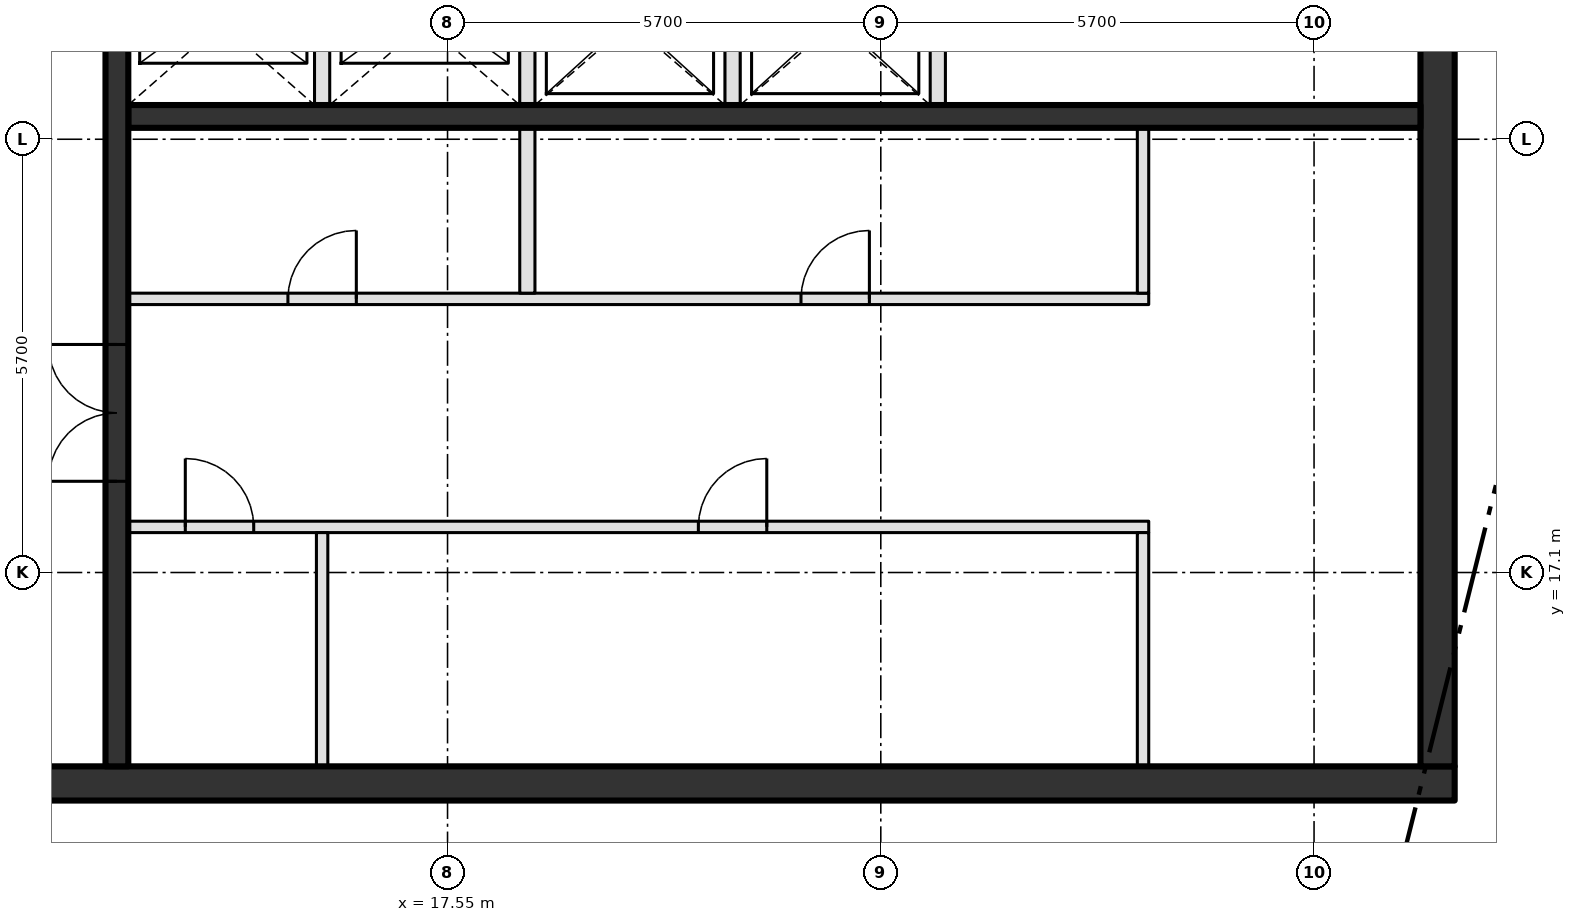
"""IFC4 building model, lengths in metres.
Left out: names, types, materials, properties, quantities, classifications, styles, units other than length and angle.
Written with IfcOpenShell. Run it as: python <this file> out.ifc"""

import sys

from ifc_helpers import new_model, si_unit, direction, frame, frame_2d, origin, place, context, subcontext, project, spatial, rectangle, extrude, element, fill, save


model = new_model("IFC4")
c1 = context("Model", 3, precision=1e-05, world=origin(), true_north=direction((0.0, 1.0)))
c2 = subcontext(c1, "Body", "Model", "MODEL_VIEW")
j1 = project(units=[si_unit("LENGTHUNIT", "METRE"), si_unit("PLANEANGLEUNIT", "RADIAN")], contexts=[c1])
p1 = place(None, origin())
s1 = spatial("IfcSite", under=j1, at=p1, CompositionType="ELEMENT")
p2 = place(p1, origin())
s2 = spatial("IfcBuilding", under=s1, at=p2, CompositionType="ELEMENT")
p3 = place(p2, frame((0.0, 0.0, 414.6)))
s3 = spatial("IfcBuildingStorey", under=s2, at=p3, CompositionType="ELEMENT", Elevation=414.6)
p4 = place(p3, frame((8.0, 14.325, -0.3), z_axis=(0.0, 0.0, 1.0), x_axis=(1.0, 0.0, 0.0)))
e1 = element("IfcWall", 1, at=p4, inside=s3, PredefinedType="SHEAR", context=c2, shape_type="SweptSolid", body=[
    extrude(rectangle(XDim=22.8, YDim=0.45, at=frame_2d((11.4, 0.0))), origin(), (0.0, 0.0, 1.0), 4.65),
])
p5 = place(p4, frame((2.3, 0.0, 0.3)))
e2 = element("IfcOpeningElement", 2, at=p5, cuts=e1, PredefinedType="OPENING", context=c2, shape_type="SweptSolid", body=[
    extrude(rectangle(XDim=1.8, YDim=2.1, at=frame_2d((0.9, 1.05))), frame((0.0, 0.235, 0.0), z_axis=(0.0, -1.0, 0.0), x_axis=(1.0, 0.0, 0.0)), (0.0, 0.0, 1.0), 0.47),
])
p6 = place(p3, frame((30.575, 14.55, -0.3), z_axis=(0.0, 0.0, 1.0), x_axis=(0.0, 1.0, 0.0)))
e3 = element("IfcWall", 3, at=p6, inside=s3, PredefinedType="SHEAR", context=c2, shape_type="SweptSolid", body=[
    extrude(rectangle(XDim=21.15, YDim=0.45, at=frame_2d((10.575, 0.0))), origin(), (0.0, 0.0, 1.0), 4.65),
])
p7 = place(p3, frame((13.35, 17.7, 0.0), z_axis=(0.0, 0.0, 1.0), x_axis=(1.0, 0.0, 0.0)))
e4 = element("IfcWall", 4, at=p7, inside=s3, PredefinedType="PARTITIONING", context=c2, shape_type="SweptSolid", body=[
    extrude(rectangle(XDim=13.425, YDim=0.15, at=frame_2d((6.712, 0.0))), origin(), (0.0, 0.0, 1.0), 4.35),
])
p8 = place(p7, frame((0.75, 0.0, 0.0)))
e5 = element("IfcOpeningElement", 5, at=p8, cuts=e4, PredefinedType="OPENING", context=c2, shape_type="SweptSolid", body=[
    extrude(rectangle(XDim=0.9, YDim=2.1, at=frame_2d((0.45, 1.05))), frame((0.0, 0.085, 0.0), z_axis=(0.0, -1.0, 0.0), x_axis=(1.0, 0.0, 0.0)), (0.0, 0.0, 1.0), 0.17),
])
p9 = place(p7, frame((7.5, 0.0, 0.0)))
e6 = element("IfcOpeningElement", 6, at=p9, cuts=e4, PredefinedType="OPENING", context=c2, shape_type="SweptSolid", body=[
    extrude(rectangle(XDim=0.9, YDim=2.1, at=frame_2d((0.45, 1.05))), frame((0.0, 0.085, 0.0), z_axis=(0.0, -1.0, 0.0), x_axis=(1.0, 0.0, 0.0)), (0.0, 0.0, 1.0), 0.17),
])
p10 = place(p3, frame((13.35, 20.7, 0.0), z_axis=(0.0, 0.0, 1.0), x_axis=(1.0, 0.0, 0.0)))
e7 = element("IfcWall", 7, at=p10, inside=s3, PredefinedType="PARTITIONING", context=c2, shape_type="SweptSolid", body=[
    extrude(rectangle(XDim=13.425, YDim=0.15, at=frame_2d((6.712, 0.0))), origin(), (0.0, 0.0, 1.0), 4.35),
])
p11 = place(p10, frame((2.1, 0.0, 0.0)))
e8 = element("IfcOpeningElement", 8, at=p11, cuts=e7, PredefinedType="OPENING", context=c2, shape_type="SweptSolid", body=[
    extrude(rectangle(XDim=0.9, YDim=2.1, at=frame_2d((0.45, 1.05))), frame((0.0, 0.085, 0.0), z_axis=(0.0, -1.0, 0.0), x_axis=(1.0, 0.0, 0.0)), (0.0, 0.0, 1.0), 0.17),
])
p12 = place(p10, frame((8.85, 0.0, 0.0)))
e9 = element("IfcOpeningElement", 9, at=p12, cuts=e7, PredefinedType="OPENING", context=c2, shape_type="SweptSolid", body=[
    extrude(rectangle(XDim=0.9, YDim=2.1, at=frame_2d((0.45, 1.05))), frame((0.0, 0.085, 0.0), z_axis=(0.0, -1.0, 0.0), x_axis=(1.0, 0.0, 0.0)), (0.0, 0.0, 1.0), 0.17),
])
p13 = place(p3, frame((13.35, 23.1, 0.0), z_axis=(0.0, 0.0, 1.0), x_axis=(1.0, 0.0, 0.0)))
e10 = element("IfcWall", 10, at=p13, inside=s3, PredefinedType="SHEAR", context=c2, shape_type="SweptSolid", body=[
    extrude(rectangle(XDim=17.0, YDim=0.3, at=frame_2d((8.5, 0.0))), origin(), (0.0, 0.0, 1.0), 4.35),
])
p14 = place(p3, frame((13.2, 14.55, 0.0), z_axis=(0.0, 0.0, 1.0), x_axis=(0.0, 1.0, 0.0)))
e11 = element("IfcWall", 11, at=p14, inside=s3, PredefinedType="SHEAR", context=c2, shape_type="SweptSolid", body=[
    extrude(rectangle(XDim=21.15, YDim=0.3, at=frame_2d((10.575, 0.0))), origin(), (0.0, 0.0, 1.0), 4.35),
])
p15 = place(p14, frame((3.75, 0.0, 0.0)))
e12 = element("IfcOpeningElement", 12, at=p15, cuts=e11, PredefinedType="OPENING", context=c2, shape_type="SweptSolid", body=[
    extrude(rectangle(XDim=1.8, YDim=2.1, at=frame_2d((0.9, 1.05))), frame((0.0, 0.16, 0.0), z_axis=(0.0, -1.0, 0.0), x_axis=(1.0, 0.0, 0.0)), (0.0, 0.0, 1.0), 0.32),
])
p16 = place(p14, frame((11.85, 0.0, 0.0)))
e13 = element("IfcOpeningElement", 13, at=p16, cuts=e11, PredefinedType="OPENING", context=c2, shape_type="SweptSolid", body=[
    extrude(rectangle(XDim=1.2, YDim=2.1, at=frame_2d((0.6, 1.05))), frame((0.0, 0.16, 0.0), z_axis=(0.0, -1.0, 0.0), x_axis=(1.0, 0.0, 0.0)), (0.0, 0.0, 1.0), 0.32),
])
p17 = place(p3, frame((15.9, 14.55, 0.0), z_axis=(0.0, 0.0, 1.0), x_axis=(0.0, 1.0, 0.0)))
e14 = element("IfcWall", 14, at=p17, inside=s3, PredefinedType="PARTITIONING", context=c2, shape_type="SweptSolid", body=[
    extrude(rectangle(XDim=3.075, YDim=0.15, at=frame_2d((1.538, 0.0))), origin(), (0.0, 0.0, 1.0), 4.35),
])
p18 = place(p3, frame((15.9, 23.25, 0.0), z_axis=(0.0, 0.0, 1.0), x_axis=(0.0, 1.0, 0.0)))
e15 = element("IfcWall", 15, at=p18, inside=s3, PredefinedType="SOLIDWALL", context=c2, shape_type="SweptSolid", body=[
    extrude(rectangle(XDim=2.15, YDim=0.2, at=frame_2d((1.075, 0.0))), origin(), (0.0, 0.0, 1.0), 4.35),
])
p19 = place(p3, frame((18.6, 20.775, 0.0), z_axis=(0.0, 0.0, 1.0), x_axis=(0.0, 1.0, 0.0)))
e16 = element("IfcWall", 16, at=p19, inside=s3, PredefinedType="SOLIDWALL", context=c2, shape_type="SweptSolid", body=[
    extrude(rectangle(XDim=7.625, YDim=0.2, at=frame_2d((3.812, 0.0))), origin(), (0.0, 0.0, 1.0), 4.35),
])
p20 = place(p19, frame((5.625, 0.0, 0.0)))
e17 = element("IfcOpeningElement", 17, at=p20, cuts=e16, PredefinedType="OPENING", context=c2, shape_type="SweptSolid", body=[
    extrude(rectangle(XDim=1.2, YDim=2.1, at=frame_2d((0.6, 1.05))), frame((0.0, 0.11, 0.0), z_axis=(0.0, -1.0, 0.0), x_axis=(1.0, 0.0, 0.0)), (0.0, 0.0, 1.0), 0.22),
])
for number, where, z_axis, x_axis in (
    (18, (21.3, 23.25, 0.0), (0.0, 0.0, 1.0), (0.0, 1.0, 0.0)),
    (19, (24.0, 23.25, 0.0), (0.0, 0.0, 1.0), (0.0, 1.0, 0.0)),
):
    element("IfcWall", number, at=place(p3, frame(where, z_axis=z_axis, x_axis=x_axis)), inside=s3, PredefinedType="SOLIDWALL", context=c2, shape_type="SweptSolid", body=[
        extrude(rectangle(XDim=2.15, YDim=0.2, at=frame_2d((1.075, 0.0))), origin(), (0.0, 0.0, 1.0), 4.35),
    ])
p21 = place(p3, frame((26.7, 14.55, 0.0), z_axis=(0.0, 0.0, 1.0), x_axis=(0.0, 1.0, 0.0)))
e20 = element("IfcWall", 20, at=p21, inside=s3, PredefinedType="PARTITIONING", context=c2, shape_type="SweptSolid", body=[
    extrude(rectangle(XDim=3.075, YDim=0.15, at=frame_2d((1.538, 0.0))), origin(), (0.0, 0.0, 1.0), 4.35),
])
p22 = place(p3, frame((26.7, 20.775, 0.0), z_axis=(0.0, 0.0, 1.0), x_axis=(0.0, 1.0, 0.0)))
e21 = element("IfcWall", 21, at=p22, inside=s3, PredefinedType="PARTITIONING", context=c2, shape_type="SweptSolid", body=[
    extrude(rectangle(XDim=2.175, YDim=0.15, at=frame_2d((1.087, 0.0))), origin(), (0.0, 0.0, 1.0), 4.35),
])
p23 = place(p8, origin())
e22 = element("IfcDoor", 22, at=p23, inside=s3, OperationType="SINGLE_SWING_LEFT", PredefinedType="DOOR", context=c2, shape_type="SweptSolid", body=[
    extrude(rectangle(XDim=0.9, YDim=2.1, at=frame_2d((0.45, 1.05))), frame((0.0, 0.025, 0.0), z_axis=(0.0, -1.0, 0.0), x_axis=(1.0, 0.0, 0.0)), (0.0, 0.0, 1.0), 0.05),
])
fill(e5, e22)
p24 = place(p9, origin())
e23 = element("IfcDoor", 23, at=p24, inside=s3, OperationType="SINGLE_SWING_RIGHT", PredefinedType="DOOR", context=c2, shape_type="SweptSolid", body=[
    extrude(rectangle(XDim=0.9, YDim=2.1, at=frame_2d((0.45, 1.05))), frame((0.0, 0.025, 0.0), z_axis=(0.0, -1.0, 0.0), x_axis=(1.0, 0.0, 0.0)), (0.0, 0.0, 1.0), 0.05),
])
fill(e6, e23)
p25 = place(p11, origin())
e24 = element("IfcDoor", 24, at=p25, inside=s3, OperationType="SINGLE_SWING_RIGHT", PredefinedType="DOOR", context=c2, shape_type="SweptSolid", body=[
    extrude(rectangle(XDim=0.9, YDim=2.1, at=frame_2d((0.45, 1.05))), frame((0.0, 0.025, 0.0), z_axis=(0.0, -1.0, 0.0), x_axis=(1.0, 0.0, 0.0)), (0.0, 0.0, 1.0), 0.05),
])
fill(e8, e24)
p26 = place(p12, origin())
e25 = element("IfcDoor", 25, at=p26, inside=s3, OperationType="SINGLE_SWING_RIGHT", PredefinedType="DOOR", context=c2, shape_type="SweptSolid", body=[
    extrude(rectangle(XDim=0.9, YDim=2.1, at=frame_2d((0.45, 1.05))), frame((0.0, 0.025, 0.0), z_axis=(0.0, -1.0, 0.0), x_axis=(1.0, 0.0, 0.0)), (0.0, 0.0, 1.0), 0.05),
])
fill(e9, e25)
p27 = place(p15, origin())
e26 = element("IfcDoor", 26, at=p27, inside=s3, OperationType="DOUBLE_DOOR_SINGLE_SWING", PredefinedType="DOOR", context=c2, shape_type="SweptSolid", body=[
    extrude(rectangle(XDim=1.8, YDim=2.1, at=frame_2d((0.9, 1.05))), frame((0.0, 0.025, 0.0), z_axis=(0.0, -1.0, 0.0), x_axis=(1.0, 0.0, 0.0)), (0.0, 0.0, 1.0), 0.05),
])
fill(e12, e26)
save(model, sys.argv[1])
